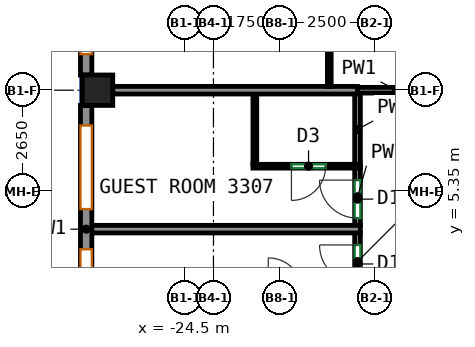
"""IFC4 building model, lengths in metres.
Left out: names, types, materials, properties, quantities, classifications, styles, units other than length and angle.
Written with IfcOpenShell. Run it as: python <this file> out.ifc"""

import sys

from ifc_helpers import new_model, si_unit, direction, frame, frame_2d, origin, origin_2d, place, context, subcontext, project, spatial, rectangle, extrude, source, transform, mapped, element, fill, save


model = new_model("IFC4")
c1 = context("Model", 3, precision=1e-05, world=origin(), true_north=direction((0.0, 1.0)))
c2 = subcontext(c1, "Body", "Model", "MODEL_VIEW")
j1 = project(units=[si_unit("LENGTHUNIT", "METRE"), si_unit("PLANEANGLEUNIT", "RADIAN")], contexts=[c1])
p1 = place(None, origin())
s1 = spatial("IfcSite", under=j1, at=p1, CompositionType="ELEMENT")
p2 = place(p1, origin())
s2 = spatial("IfcBuilding", under=s1, at=p2, CompositionType="ELEMENT")
p3 = place(p2, frame((0.0, 0.0, 147.3)))
s3 = spatial("IfcBuildingStorey", under=s2, at=p3, CompositionType="ELEMENT", Elevation=147.3)
m1 = source(origin(), c2, "Body", "SweptSolid", [
    extrude(rectangle(XDim=0.8, YDim=0.8, at=origin_2d()), origin(), (0.0, 0.0, 1.0), 3.12),
])
p4 = place(p3, frame((-26.8, 8.0, 0.0), z_axis=(0.0, 0.0, 1.0), x_axis=(1.0, 0.0, 0.0)))
e1 = element("IfcColumn", 1, at=p4, inside=s3, PredefinedType="COLUMN", context=c2, shape_type="MappedRepresentation", body=[
    mapped(m1, transform((0.0, 0.0, 0.0))),
])
m2 = source(origin(), c2, "Body", "SweptSolid", [
    extrude(rectangle(XDim=13.2, YDim=0.3, at=frame_2d((6.6, 0.0))), origin(), (0.0, 0.0, 1.0), 3.12),
])
p5 = place(p3, frame((-27.1, 21.6, 0.0), z_axis=(0.0, 0.0, 1.0), x_axis=(0.0, -1.0, 0.0)))
e2 = element("IfcWall", 2, at=p5, inside=s3, PredefinedType="SOLIDWALL", context=c2, shape_type="MappedRepresentation", body=[
    mapped(m2, transform((0.0, 0.0, 0.0))),
])
p6 = place(p5, frame((0.55, 0.0, 0.85)))
e3 = element("IfcOpeningElement", 3, at=p6, cuts=e2, PredefinedType="OPENING", context=c2, shape_type="SweptSolid", body=[
    extrude(rectangle(XDim=2.2, YDim=1.95, at=frame_2d((1.1, 0.975))), frame((0.0, 0.16, 0.0), z_axis=(0.0, -1.0, 0.0), x_axis=(1.0, 0.0, 0.0)), (0.0, 0.0, 1.0), 0.32),
])
p7 = place(p5, frame((3.85, 0.0, 0.85)))
e4 = element("IfcOpeningElement", 4, at=p7, cuts=e2, PredefinedType="OPENING", context=c2, shape_type="SweptSolid", body=[
    extrude(rectangle(XDim=2.2, YDim=1.95, at=frame_2d((1.1, 0.975))), frame((0.0, 0.16, 0.0), z_axis=(0.0, -1.0, 0.0), x_axis=(1.0, 0.0, 0.0)), (0.0, 0.0, 1.0), 0.32),
])
p8 = place(p5, frame((7.15, 0.0, 0.85)))
e5 = element("IfcOpeningElement", 5, at=p8, cuts=e2, PredefinedType="OPENING", context=c2, shape_type="SweptSolid", body=[
    extrude(rectangle(XDim=2.2, YDim=1.95, at=frame_2d((1.1, 0.975))), frame((0.0, 0.16, 0.0), z_axis=(0.0, -1.0, 0.0), x_axis=(1.0, 0.0, 0.0)), (0.0, 0.0, 1.0), 0.32),
])
p9 = place(p5, frame((10.45, 0.0, 0.85)))
e6 = element("IfcOpeningElement", 6, at=p9, cuts=e2, PredefinedType="OPENING", context=c2, shape_type="SweptSolid", body=[
    extrude(rectangle(XDim=2.2, YDim=1.95, at=frame_2d((1.1, 0.975))), frame((0.0, 0.16, 0.0), z_axis=(0.0, -1.0, 0.0), x_axis=(1.0, 0.0, 0.0)), (0.0, 0.0, 1.0), 0.32),
])
m3 = source(origin(), c2, "Body", "SweptSolid", [
    extrude(rectangle(XDim=6.513, YDim=0.3, at=frame_2d((3.256, 0.0))), origin(), (0.0, 0.0, 1.0), 3.12),
])
p10 = place(p3, frame((-27.1, 7.6, 0.0), z_axis=(0.0, 0.0, 1.0), x_axis=(0.0, -1.0, 0.0)))
e7 = element("IfcWall", 7, at=p10, inside=s3, PredefinedType="SOLIDWALL", context=c2, shape_type="MappedRepresentation", body=[
    mapped(m3, transform((0.0, 0.0, 0.0))),
])
p11 = place(p10, frame((0.528, 0.0, 0.85)))
e8 = element("IfcOpeningElement", 8, at=p11, cuts=e7, PredefinedType="OPENING", context=c2, shape_type="SweptSolid", body=[
    extrude(rectangle(XDim=2.2, YDim=1.95, at=frame_2d((1.1, 0.975))), frame((0.0, 0.16, 0.0), z_axis=(0.0, -1.0, 0.0), x_axis=(1.0, 0.0, 0.0)), (0.0, 0.0, 1.0), 0.32),
])
p12 = place(p10, frame((3.784, 0.0, 0.85)))
e9 = element("IfcOpeningElement", 9, at=p12, cuts=e7, PredefinedType="OPENING", context=c2, shape_type="SweptSolid", body=[
    extrude(rectangle(XDim=2.2, YDim=1.95, at=frame_2d((1.1, 0.975))), frame((0.0, 0.16, 0.0), z_axis=(0.0, -1.0, 0.0), x_axis=(1.0, 0.0, 0.0)), (0.0, 0.0, 1.0), 0.32),
])
p13 = place(p3, frame((-19.959, 2.728, 0.0), z_axis=(0.0, 0.0, 1.0), x_axis=(0.0, 1.0, 0.0)))
e10 = element("IfcWall", 10, at=p13, inside=s3, PredefinedType="PARTITIONING", context=c2, shape_type="SweptSolid", body=[
    extrude(rectangle(XDim=1.526, YDim=0.15, at=frame_2d((0.763, 0.0))), origin(), (0.0, 0.0, 1.0), 3.12),
])
p14 = place(p13, frame((0.2, 0.0, 0.0)))
e11 = element("IfcOpeningElement", 11, at=p14, cuts=e10, PredefinedType="OPENING", context=c2, shape_type="SweptSolid", body=[
    extrude(rectangle(XDim=1.0, YDim=2.1, at=frame_2d((0.5, 1.05))), frame((0.0, 0.085, 0.0), z_axis=(0.0, -1.0, 0.0), x_axis=(1.0, 0.0, 0.0)), (0.0, 0.0, 1.0), 0.17),
])
p15 = place(p3, frame((-19.959, 4.434, 0.0), z_axis=(0.0, 0.0, 1.0), x_axis=(0.0, 1.0, 0.0)))
e12 = element("IfcWall", 12, at=p15, inside=s3, PredefinedType="PARTITIONING", context=c2, shape_type="SweptSolid", body=[
    extrude(rectangle(XDim=1.526, YDim=0.15, at=frame_2d((0.763, 0.0))), origin(), (0.0, 0.0, 1.0), 3.12),
])
p16 = place(p15, frame((0.2, 0.0, 0.0)))
e13 = element("IfcOpeningElement", 13, at=p16, cuts=e12, PredefinedType="OPENING", context=c2, shape_type="SweptSolid", body=[
    extrude(rectangle(XDim=1.0, YDim=2.1, at=frame_2d((0.5, 1.05))), frame((0.0, 0.085, 0.0), z_axis=(0.0, -1.0, 0.0), x_axis=(1.0, 0.0, 0.0)), (0.0, 0.0, 1.0), 0.17),
])
p17 = place(p3, frame((-19.959, 6.04, 0.0), z_axis=(0.0, 0.0, 1.0), x_axis=(0.0, 1.0, 0.0)))
e14 = element("IfcWall", 14, at=p17, inside=s3, PredefinedType="PARTITIONING", context=c2, shape_type="SweptSolid", body=[
    extrude(rectangle(XDim=1.86, YDim=0.15, at=frame_2d((0.93, 0.0))), origin(), (0.0, 0.0, 1.0), 3.12),
])
p18 = place(p3, frame((-17.925, 8.0, 0.0), z_axis=(0.0, 0.0, 1.0), x_axis=(-1.0, 0.0, 0.0)))
e15 = element("IfcWall", 15, at=p18, inside=s3, PredefinedType="PARTITIONING", context=c2, shape_type="SweptSolid", body=[
    extrude(rectangle(XDim=2.034, YDim=0.15, at=frame_2d((1.017, 0.0))), origin(), (0.0, 0.0, 1.0), 3.12),
])
p19 = place(p3, frame((-27.0, 4.344, 0.0), z_axis=(0.0, 0.0, 1.0), x_axis=(1.0, 0.0, 0.0)))
e16 = element("IfcWall", 16, at=p19, inside=s3, PredefinedType="PARTITIONING", context=c2, shape_type="SweptSolid", body=[
    extrude(rectangle(XDim=7.114, YDim=0.2, at=frame_2d((3.557, 0.0))), origin(), (0.0, 0.0, 1.0), 3.12),
])
p20 = place(p3, frame((-19.886, 6.0, 0.0), z_axis=(0.0, 0.0, 1.0), x_axis=(-1.0, 0.0, 0.0)))
e17 = element("IfcWall", 17, at=p20, inside=s3, PredefinedType="PARTITIONING", context=c2, shape_type="SweptSolid", body=[
    extrude(rectangle(XDim=2.825, YDim=0.1, at=frame_2d((1.413, 0.0))), origin(), (0.0, 0.0, 1.0), 3.12),
])
p21 = place(p20, frame((0.912, 0.0, 0.0)))
e18 = element("IfcOpeningElement", 18, at=p21, cuts=e17, PredefinedType="OPENING", context=c2, shape_type="SweptSolid", body=[
    extrude(rectangle(XDim=0.9, YDim=2.1, at=frame_2d((0.45, 1.05))), frame((0.0, 0.06, 0.0), z_axis=(0.0, -1.0, 0.0), x_axis=(1.0, 0.0, 0.0)), (0.0, 0.0, 1.0), 0.12),
])
p22 = place(p3, frame((-22.661, 6.05, 0.0), z_axis=(0.0, 0.0, 1.0), x_axis=(0.0, 1.0, 0.0)))
e19 = element("IfcWall", 19, at=p22, inside=s3, PredefinedType="PARTITIONING", context=c2, shape_type="SweptSolid", body=[
    extrude(rectangle(XDim=1.85, YDim=0.1, at=frame_2d((0.925, 0.0))), origin(), (0.0, 0.0, 1.0), 3.12),
])
p23 = place(p3, frame((-26.4, 8.0, 0.0), z_axis=(0.0, 0.0, 1.0), x_axis=(1.0, 0.0, 0.0)))
e20 = element("IfcWall", 20, at=p23, inside=s3, PredefinedType="PARTITIONING", context=c2, shape_type="SweptSolid", body=[
    extrude(rectangle(XDim=6.439, YDim=0.2, at=frame_2d((3.219, 0.0))), origin(), (0.0, 0.0, 1.0), 3.12),
])
p24 = place(p3, frame((-20.702, 8.1, 0.0), z_axis=(0.0, 0.0, 1.0), x_axis=(0.0, 1.0, 0.0)))
e21 = element("IfcWall", 21, at=p24, inside=s3, PredefinedType="PARTITIONING", context=c2, shape_type="SweptSolid", body=[
    extrude(rectangle(XDim=1.85, YDim=0.1, at=frame_2d((0.925, 0.0))), origin(), (0.0, 0.0, 1.0), 3.12),
])
p25 = place(p9, origin())
e22 = element("IfcWindow", 22, at=p25, inside=s3, PartitioningType="SINGLE_PANEL", PredefinedType="WINDOW", context=c2, shape_type="SweptSolid", body=[
    extrude(rectangle(XDim=2.2, YDim=1.95, at=frame_2d((1.1, 0.975))), frame((0.0, 0.03, 0.0), z_axis=(0.0, -1.0, 0.0), x_axis=(1.0, 0.0, 0.0)), (0.0, 0.0, 1.0), 0.06),
])
fill(e6, e22)
p26 = place(p11, origin())
e23 = element("IfcWindow", 23, at=p26, inside=s3, PartitioningType="SINGLE_PANEL", PredefinedType="WINDOW", context=c2, shape_type="SweptSolid", body=[
    extrude(rectangle(XDim=2.2, YDim=1.95, at=frame_2d((1.1, 0.975))), frame((0.0, 0.03, 0.0), z_axis=(0.0, -1.0, 0.0), x_axis=(1.0, 0.0, 0.0)), (0.0, 0.0, 1.0), 0.06),
])
fill(e8, e23)
p27 = place(p12, origin())
e24 = element("IfcWindow", 24, at=p27, inside=s3, PartitioningType="SINGLE_PANEL", PredefinedType="WINDOW", context=c2, shape_type="SweptSolid", body=[
    extrude(rectangle(XDim=2.2, YDim=1.95, at=frame_2d((1.1, 0.975))), frame((0.0, 0.03, 0.0), z_axis=(0.0, -1.0, 0.0), x_axis=(1.0, 0.0, 0.0)), (0.0, 0.0, 1.0), 0.06),
])
fill(e9, e24)
p28 = place(p14, origin())
e25 = element("IfcDoor", 25, at=p28, inside=s3, OperationType="SINGLE_SWING_RIGHT", PredefinedType="DOOR", context=c2, shape_type="SweptSolid", body=[
    extrude(rectangle(XDim=1.0, YDim=2.1, at=frame_2d((0.5, 1.05))), frame((0.0, 0.025, 0.0), z_axis=(0.0, -1.0, 0.0), x_axis=(1.0, 0.0, 0.0)), (0.0, 0.0, 1.0), 0.05),
])
fill(e11, e25)
p29 = place(p16, origin())
e26 = element("IfcDoor", 26, at=p29, inside=s3, OperationType="SINGLE_SWING_RIGHT", PredefinedType="DOOR", context=c2, shape_type="SweptSolid", body=[
    extrude(rectangle(XDim=1.0, YDim=2.1, at=frame_2d((0.5, 1.05))), frame((0.0, 0.025, 0.0), z_axis=(0.0, -1.0, 0.0), x_axis=(1.0, 0.0, 0.0)), (0.0, 0.0, 1.0), 0.05),
])
fill(e13, e26)
p30 = place(p21, origin())
e27 = element("IfcDoor", 27, at=p30, inside=s3, OperationType="SINGLE_SWING_RIGHT", PredefinedType="DOOR", context=c2, shape_type="SweptSolid", body=[
    extrude(rectangle(XDim=0.9, YDim=2.1, at=frame_2d((0.45, 1.05))), frame((0.0, 0.025, 0.0), z_axis=(0.0, -1.0, 0.0), x_axis=(1.0, 0.0, 0.0)), (0.0, 0.0, 1.0), 0.05),
])
fill(e18, e27)
save(model, sys.argv[1])
